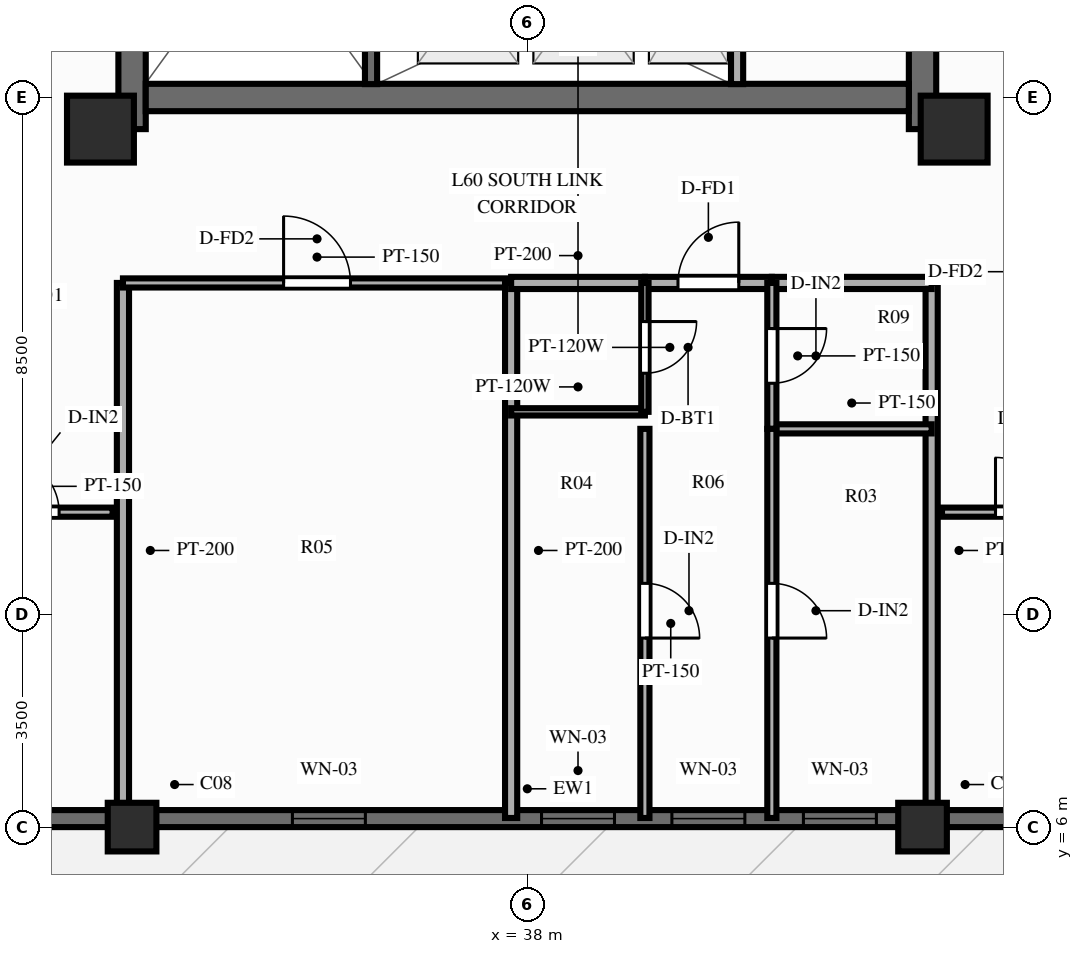
"""IFC4 building model, lengths in metres.
Left out: names, types, materials, properties, quantities, classifications, styles, units other than length and angle.
Written with IfcOpenShell. Run it as: python <this file> out.ifc"""

import sys

from ifc_helpers import new_model, si_unit, direction, frame, frame_2d, origin, origin_2d, place, context, subcontext, project, spatial, rectangle, extrude, source, transform, mapped, element, fill, save


model = new_model("IFC4")
c1 = context("Model", 3, precision=1e-05, world=origin(), true_north=direction((0.0, 1.0)))
c2 = subcontext(c1, "Body", "Model", "MODEL_VIEW")
j1 = project(units=[si_unit("LENGTHUNIT", "METRE"), si_unit("PLANEANGLEUNIT", "RADIAN")], contexts=[c1])
p1 = place(None, origin())
s1 = spatial("IfcSite", under=j1, at=p1, CompositionType="ELEMENT")
p2 = place(p1, origin())
s2 = spatial("IfcBuilding", under=s1, at=p2, CompositionType="ELEMENT")
p3 = place(p2, frame((0.0, 0.0, 192.7)))
s3 = spatial("IfcBuildingStorey", under=s2, at=p3, CompositionType="ELEMENT", Elevation=192.7)
p4 = place(p3, frame((31.5, 17.48, 0.0), z_axis=(0.0, 0.0, 1.0), x_axis=(0.0, 1.0, 0.0)))
e1 = element("IfcWall", 1, at=p4, inside=s3, PredefinedType="SHEAR", context=c2, shape_type="SweptSolid", body=[
    extrude(rectangle(XDim=19.04, YDim=0.45, at=frame_2d((9.52, 0.0))), origin(), (0.0, 0.0, 1.0), 3.9),
])
p5 = place(p4, frame((6.32, 0.0, 0.0)))
e2 = element("IfcOpeningElement", 2, at=p5, cuts=e1, PredefinedType="OPENING", context=c2, shape_type="SweptSolid", body=[
    extrude(rectangle(XDim=1.1, YDim=2.15, at=frame_2d((0.55, 1.075))), frame((0.0, 0.237, 0.0), z_axis=(0.0, -1.0, 0.0), x_axis=(1.0, 0.0, 0.0)), (0.0, 0.0, 1.0), 0.474),
])
p6 = place(p3, frame((44.5, 17.48, 0.0), z_axis=(0.0, 0.0, 1.0), x_axis=(0.0, 1.0, 0.0)))
e3 = element("IfcWall", 3, at=p6, inside=s3, PredefinedType="SHEAR", context=c2, shape_type="SweptSolid", body=[
    extrude(rectangle(XDim=19.04, YDim=0.45, at=frame_2d((9.52, 0.0))), origin(), (0.0, 0.0, 1.0), 3.9),
])
p7 = place(p6, frame((12.67, 0.0, 0.0), z_axis=(0.0, 0.0, 1.0), x_axis=(-1.0, 0.0, 0.0)))
e4 = element("IfcOpeningElement", 4, at=p7, cuts=e3, PredefinedType="OPENING", context=c2, shape_type="SweptSolid", body=[
    extrude(rectangle(XDim=1.1, YDim=2.15, at=frame_2d((0.55, 1.075))), frame((0.0, 0.237, 0.0), z_axis=(0.0, -1.0, 0.0), x_axis=(1.0, 0.0, 0.0)), (0.0, 0.0, 1.0), 0.474),
])
p8 = place(p3, frame((31.725, 18.0, 0.0), z_axis=(0.0, 0.0, 1.0), x_axis=(1.0, 0.0, 0.0)))
e5 = element("IfcWall", 5, at=p8, inside=s3, PredefinedType="SHEAR", context=c2, shape_type="SweptSolid", body=[
    extrude(rectangle(XDim=12.55, YDim=0.45, at=frame_2d((6.275, 0.0))), origin(), (0.0, 0.0, 1.0), 3.9),
])
m1 = source(origin(), c2, "Body", "SweptSolid", [
    extrude(rectangle(XDim=1.1, YDim=1.1, at=origin_2d()), origin(), (0.0, 0.0, 1.0), 3.9),
])
for number, where, z_axis, x_axis in (
    (6, (30.98, 17.48, 0.0), (0.0, 0.0, 1.0), (1.0, 0.0, 0.0)),
    (7, (45.02, 17.48, 0.0), (0.0, 0.0, 1.0), (1.0, 0.0, 0.0)),
):
    element("IfcColumn", number, at=place(p3, frame(where, z_axis=z_axis, x_axis=x_axis)), inside=s3, PredefinedType="COLUMN", context=c2, shape_type="MappedRepresentation", body=[
        mapped(m1, transform((0.0, 0.0, 0.0), scale=1.0)),
    ])
m2 = source(origin(), c2, "Body", "SweptSolid", [
    extrude(rectangle(XDim=0.8, YDim=0.8, at=origin_2d()), origin(), (0.0, 0.0, 1.0), 3.9),
])
for number, where, z_axis, x_axis in (
    (8, (31.5, 6.0, 0.0), (0.0, 0.0, 1.0), (1.0, 0.0, 0.0)),
    (9, (44.5, 6.0, 0.0), (0.0, 0.0, 1.0), (1.0, 0.0, 0.0)),
):
    element("IfcColumn", number, at=place(p3, frame(where, z_axis=z_axis, x_axis=x_axis)), inside=s3, PredefinedType="COLUMN", context=c2, shape_type="MappedRepresentation", body=[
        mapped(m2, transform((0.0, 0.0, 0.0), scale=1.0)),
    ])
p9 = place(p3, frame((22.75, 6.14, 0.0), z_axis=(0.0, 0.0, 1.0), x_axis=(1.0, 0.0, 0.0)))
e10 = element("IfcWall", 10, at=p9, inside=s3, PredefinedType="SOLIDWALL", context=c2, shape_type="SweptSolid", body=[
    extrude(rectangle(XDim=30.5, YDim=0.28, at=frame_2d((15.25, 0.0))), origin(), (0.0, 0.0, 1.0), 2.44),
])
p10 = place(p9, frame((4.925, 0.0, 0.0), z_axis=(0.0, 0.0, 1.0), x_axis=(-1.0, 0.0, 0.0)))
e11 = element("IfcOpeningElement", 11, at=p10, cuts=e10, PredefinedType="OPENING", context=c2, shape_type="SweptSolid", body=[
    extrude(rectangle(XDim=1.1, YDim=2.15, at=frame_2d((0.55, 1.075))), frame((0.0, 0.152, 0.0), z_axis=(0.0, -1.0, 0.0), x_axis=(1.0, 0.0, 0.0)), (0.0, 0.0, 1.0), 0.304),
])
p11 = place(p9, frame((11.387, 0.0, 0.25)))
e12 = element("IfcOpeningElement", 12, at=p11, cuts=e10, PredefinedType="OPENING", context=c2, shape_type="SweptSolid", body=[
    extrude(rectangle(XDim=1.2, YDim=1.5, at=frame_2d((0.6, 0.75))), frame((0.0, 0.152, 0.0), z_axis=(0.0, -1.0, 0.0), x_axis=(1.0, 0.0, 0.0)), (0.0, 0.0, 1.0), 0.304),
])
p12 = place(p9, frame((15.484, 0.0, 0.25)))
e13 = element("IfcOpeningElement", 13, at=p12, cuts=e10, PredefinedType="OPENING", context=c2, shape_type="SweptSolid", body=[
    extrude(rectangle(XDim=1.2, YDim=1.5, at=frame_2d((0.6, 0.75))), frame((0.0, 0.152, 0.0), z_axis=(0.0, -1.0, 0.0), x_axis=(1.0, 0.0, 0.0)), (0.0, 0.0, 1.0), 0.304),
])
p13 = place(p9, frame((17.628, 0.0, 0.25)))
e14 = element("IfcOpeningElement", 14, at=p13, cuts=e10, PredefinedType="OPENING", context=c2, shape_type="SweptSolid", body=[
    extrude(rectangle(XDim=1.2, YDim=1.5, at=frame_2d((0.6, 0.75))), frame((0.0, 0.152, 0.0), z_axis=(0.0, -1.0, 0.0), x_axis=(1.0, 0.0, 0.0)), (0.0, 0.0, 1.0), 0.304),
])
p14 = place(p9, frame((19.791, 0.0, 0.25)))
e15 = element("IfcOpeningElement", 15, at=p14, cuts=e10, PredefinedType="OPENING", context=c2, shape_type="SweptSolid", body=[
    extrude(rectangle(XDim=1.2, YDim=1.5, at=frame_2d((0.6, 0.75))), frame((0.0, 0.152, 0.0), z_axis=(0.0, -1.0, 0.0), x_axis=(1.0, 0.0, 0.0)), (0.0, 0.0, 1.0), 0.304),
])
p15 = place(p9, frame((25.525, 0.0, 0.25)))
e16 = element("IfcOpeningElement", 16, at=p15, cuts=e10, PredefinedType="OPENING", context=c2, shape_type="SweptSolid", body=[
    extrude(rectangle(XDim=1.2, YDim=1.5, at=frame_2d((0.6, 0.75))), frame((0.0, 0.152, 0.0), z_axis=(0.0, -1.0, 0.0), x_axis=(1.0, 0.0, 0.0)), (0.0, 0.0, 1.0), 0.304),
])
p16 = place(p3, frame((41.45, 18.22, 0.0), z_axis=(0.0, 0.0, 1.0), x_axis=(0.0, 1.0, 0.0)))
e17 = element("IfcWall", 17, at=p16, inside=s3, PredefinedType="PARTITIONING", context=c2, shape_type="SweptSolid", body=[
    extrude(rectangle(XDim=2.96, YDim=0.2, at=frame_2d((1.48, 0.0))), origin(), (0.0, 0.0, 1.0), 3.56),
])
p17 = place(p3, frame((35.43, 18.22, 0.0), z_axis=(0.0, 0.0, 1.0), x_axis=(0.0, 1.0, 0.0)))
e18 = element("IfcWall", 18, at=p17, inside=s3, PredefinedType="SOLIDWALL", context=c2, shape_type="SweptSolid", body=[
    extrude(rectangle(XDim=7.22, YDim=0.2, at=frame_2d((3.61, 0.0))), origin(), (0.0, 0.0, 1.0), 3.69),
])
p18 = place(p17, frame((6.68, 0.0, 0.0), z_axis=(0.0, 0.0, 1.0), x_axis=(-1.0, 0.0, 0.0)))
e19 = element("IfcOpeningElement", 19, at=p18, cuts=e18, PredefinedType="OPENING", context=c2, shape_type="SweptSolid", body=[
    extrude(rectangle(XDim=1.1, YDim=2.15, at=frame_2d((0.55, 1.075))), frame((0.0, 0.112, 0.0), z_axis=(0.0, -1.0, 0.0), x_axis=(1.0, 0.0, 0.0)), (0.0, 0.0, 1.0), 0.224),
])
p19 = place(p3, frame((28.85, 11.18, 0.0), z_axis=(0.0, 0.0, 1.0), x_axis=(1.0, 0.0, 0.0)))
e20 = element("IfcWall", 20, at=p19, inside=s3, PredefinedType="PARTITIONING", context=c2, shape_type="SweptSolid", body=[
    extrude(rectangle(XDim=2.33, YDim=0.15, at=frame_2d((1.165, 0.0))), origin(), (0.0, 0.0, 1.0), 2.24),
])
p20 = place(p19, frame((0.55, 0.0, 0.0)))
e21 = element("IfcOpeningElement", 21, at=p20, cuts=e20, PredefinedType="OPENING", context=c2, shape_type="SweptSolid", body=[
    extrude(rectangle(XDim=0.9, YDim=2.1, at=frame_2d((0.45, 1.05))), frame((0.0, 0.087, 0.0), z_axis=(0.0, -1.0, 0.0), x_axis=(1.0, 0.0, 0.0)), (0.0, 0.0, 1.0), 0.174),
])
p21 = place(p3, frame((44.82, 11.18, 0.0), z_axis=(0.0, 0.0, 1.0), x_axis=(1.0, 0.0, 0.0)))
e22 = element("IfcWall", 22, at=p21, inside=s3, PredefinedType="PARTITIONING", context=c2, shape_type="SweptSolid", body=[
    extrude(rectangle(XDim=2.33, YDim=0.15, at=frame_2d((1.165, 0.0))), origin(), (0.0, 0.0, 1.0), 2.24),
])
p22 = place(p21, frame((0.88, 0.0, 0.0)))
e23 = element("IfcOpeningElement", 23, at=p22, cuts=e22, PredefinedType="OPENING", context=c2, shape_type="SweptSolid", body=[
    extrude(rectangle(XDim=0.9, YDim=2.1, at=frame_2d((0.45, 1.05))), frame((0.0, 0.087, 0.0), z_axis=(0.0, -1.0, 0.0), x_axis=(1.0, 0.0, 0.0)), (0.0, 0.0, 1.0), 0.174),
])
for number, where, z_axis, x_axis in (
    (24, (31.35, 14.95, 0.0), (0.0, 0.0, 1.0), (0.0, -1.0, 0.0)),
    (25, (44.65, 14.95, 0.0), (0.0, 0.0, 1.0), (0.0, -1.0, 0.0)),
):
    element("IfcWall", number, at=place(p3, frame(where, z_axis=z_axis, x_axis=x_axis)), inside=s3, PredefinedType="PARTITIONING", context=c2, shape_type="SweptSolid", body=[
        extrude(rectangle(XDim=8.8, YDim=0.2, at=frame_2d((4.4, 0.0))), origin(), (0.0, 0.0, 1.0), 2.44),
    ])
p23 = place(p3, frame((31.35, 14.95, 0.0), z_axis=(0.0, 0.0, 1.0), x_axis=(1.0, 0.0, 0.0)))
e26 = element("IfcWall", 26, at=p23, inside=s3, PredefinedType="PARTITIONING", context=c2, shape_type="SweptSolid", body=[
    extrude(rectangle(XDim=6.384, YDim=0.15, at=frame_2d((3.192, 0.0))), origin(), (0.0, 0.0, 1.0), 3.56),
])
p24 = place(p23, frame((2.642, 0.0, 0.0)))
e27 = element("IfcOpeningElement", 27, at=p24, cuts=e26, PredefinedType="OPENING", context=c2, shape_type="SweptSolid", body=[
    extrude(rectangle(XDim=1.1, YDim=2.15, at=frame_2d((0.55, 1.075))), frame((0.0, 0.087, 0.0), z_axis=(0.0, -1.0, 0.0), x_axis=(1.0, 0.0, 0.0)), (0.0, 0.0, 1.0), 0.174),
])
p25 = place(p3, frame((37.734, 14.95, 0.0), z_axis=(0.0, 0.0, 1.0), x_axis=(0.0, -1.0, 0.0)))
e28 = element("IfcWall", 28, at=p25, inside=s3, PredefinedType="PARTITIONING", context=c2, shape_type="SweptSolid", body=[
    extrude(rectangle(XDim=8.8, YDim=0.2, at=frame_2d((4.4, 0.0))), origin(), (0.0, 0.0, 1.0), 3.56),
])
p26 = place(p3, frame((37.734, 14.95, 0.0), z_axis=(0.0, 0.0, 1.0), x_axis=(1.0, 0.0, 0.0)))
e29 = element("IfcWall", 29, at=p26, inside=s3, PredefinedType="PARTITIONING", context=c2, shape_type="SweptSolid", body=[
    extrude(rectangle(XDim=2.2, YDim=0.2, at=frame_2d((1.1, 0.0))), origin(), (0.0, 0.0, 1.0), 3.56),
])
p27 = place(p3, frame((39.934, 14.95, 0.0), z_axis=(0.0, 0.0, 1.0), x_axis=(1.0, 0.0, 0.0)))
e30 = element("IfcWall", 30, at=p27, inside=s3, PredefinedType="PARTITIONING", context=c2, shape_type="SweptSolid", body=[
    extrude(rectangle(XDim=2.088, YDim=0.2, at=frame_2d((1.044, 0.0))), origin(), (0.0, 0.0, 1.0), 3.56),
])
p28 = place(p27, frame((0.544, 0.0, 0.0)))
e31 = element("IfcOpeningElement", 31, at=p28, cuts=e30, PredefinedType="OPENING", context=c2, shape_type="SweptSolid", body=[
    extrude(rectangle(XDim=1.0, YDim=2.15, at=frame_2d((0.5, 1.075))), frame((0.0, 0.112, 0.0), z_axis=(0.0, -1.0, 0.0), x_axis=(1.0, 0.0, 0.0)), (0.0, 0.0, 1.0), 0.224),
])
p29 = place(p3, frame((42.022, 14.95, 0.0), z_axis=(0.0, 0.0, 1.0), x_axis=(1.0, 0.0, 0.0)))
e32 = element("IfcWall", 32, at=p29, inside=s3, PredefinedType="PARTITIONING", context=c2, shape_type="SweptSolid", body=[
    extrude(rectangle(XDim=2.628, YDim=0.2, at=frame_2d((1.314, 0.0))), origin(), (0.0, 0.0, 1.0), 3.56),
])
p30 = place(p3, frame((37.734, 12.83, 0.0), z_axis=(0.0, 0.0, 1.0), x_axis=(1.0, 0.0, 0.0)))
e33 = element("IfcWall", 33, at=p30, inside=s3, PredefinedType="PARTITIONING", context=c2, shape_type="SweptSolid", body=[
    extrude(rectangle(XDim=2.2, YDim=0.12, at=frame_2d((1.1, 0.0))), origin(), (0.0, 0.0, 1.0), 3.56),
])
p31 = place(p3, frame((42.022, 12.55, 0.0), z_axis=(0.0, 0.0, 1.0), x_axis=(1.0, 0.0, 0.0)))
e34 = element("IfcWall", 34, at=p31, inside=s3, PredefinedType="PARTITIONING", context=c2, shape_type="SweptSolid", body=[
    extrude(rectangle(XDim=2.628, YDim=0.15, at=frame_2d((1.314, 0.0))), origin(), (0.0, 0.0, 1.0), 3.56),
])
p32 = place(p3, frame((39.934, 14.95, 0.0), z_axis=(0.0, 0.0, 1.0), x_axis=(0.0, -1.0, 0.0)))
e35 = element("IfcWall", 35, at=p32, inside=s3, PredefinedType="PARTITIONING", context=c2, shape_type="SweptSolid", body=[
    extrude(rectangle(XDim=2.12, YDim=0.12, at=frame_2d((1.06, 0.0))), origin(), (0.0, 0.0, 1.0), 3.56),
])
p33 = place(p32, frame((0.635, 0.0, 0.0)))
e36 = element("IfcOpeningElement", 36, at=p33, cuts=e35, PredefinedType="OPENING", context=c2, shape_type="SweptSolid", body=[
    extrude(rectangle(XDim=0.85, YDim=2.05, at=frame_2d((0.425, 1.025))), frame((0.0, 0.072, 0.0), z_axis=(0.0, -1.0, 0.0), x_axis=(1.0, 0.0, 0.0)), (0.0, 0.0, 1.0), 0.144),
])
p34 = place(p3, frame((39.934, 12.55, 0.0), z_axis=(0.0, 0.0, 1.0), x_axis=(0.0, -1.0, 0.0)))
e37 = element("IfcWall", 37, at=p34, inside=s3, PredefinedType="PARTITIONING", context=c2, shape_type="SweptSolid", body=[
    extrude(rectangle(XDim=6.4, YDim=0.15, at=frame_2d((3.2, 0.0))), origin(), (0.0, 0.0, 1.0), 3.56),
])
p35 = place(p34, frame((2.541, 0.0, 0.0)))
e38 = element("IfcOpeningElement", 38, at=p35, cuts=e37, PredefinedType="OPENING", context=c2, shape_type="SweptSolid", body=[
    extrude(rectangle(XDim=0.9, YDim=2.1, at=frame_2d((0.45, 1.05))), frame((0.0, 0.087, 0.0), z_axis=(0.0, -1.0, 0.0), x_axis=(1.0, 0.0, 0.0)), (0.0, 0.0, 1.0), 0.174),
])
p36 = place(p3, frame((42.022, 14.95, 0.0), z_axis=(0.0, 0.0, 1.0), x_axis=(0.0, -1.0, 0.0)))
e39 = element("IfcWall", 39, at=p36, inside=s3, PredefinedType="PARTITIONING", context=c2, shape_type="SweptSolid", body=[
    extrude(rectangle(XDim=2.4, YDim=0.15, at=frame_2d((1.2, 0.0))), origin(), (0.0, 0.0, 1.0), 3.56),
])
p37 = place(p36, frame((0.75, 0.0, 0.0)))
e40 = element("IfcOpeningElement", 40, at=p37, cuts=e39, PredefinedType="OPENING", context=c2, shape_type="SweptSolid", body=[
    extrude(rectangle(XDim=0.9, YDim=2.1, at=frame_2d((0.45, 1.05))), frame((0.0, 0.087, 0.0), z_axis=(0.0, -1.0, 0.0), x_axis=(1.0, 0.0, 0.0)), (0.0, 0.0, 1.0), 0.174),
])
p38 = place(p3, frame((42.022, 12.55, 0.0), z_axis=(0.0, 0.0, 1.0), x_axis=(0.0, -1.0, 0.0)))
e41 = element("IfcWall", 41, at=p38, inside=s3, PredefinedType="PARTITIONING", context=c2, shape_type="SweptSolid", body=[
    extrude(rectangle(XDim=6.4, YDim=0.15, at=frame_2d((3.2, 0.0))), origin(), (0.0, 0.0, 1.0), 3.56),
])
p39 = place(p38, frame((2.541, 0.0, 0.0)))
e42 = element("IfcOpeningElement", 42, at=p39, cuts=e41, PredefinedType="OPENING", context=c2, shape_type="SweptSolid", body=[
    extrude(rectangle(XDim=0.9, YDim=2.1, at=frame_2d((0.45, 1.05))), frame((0.0, 0.087, 0.0), z_axis=(0.0, -1.0, 0.0), x_axis=(1.0, 0.0, 0.0)), (0.0, 0.0, 1.0), 0.174),
])
m3 = source(origin(), c2, "Body", "SweptSolid", [
    extrude(rectangle(XDim=1.2, YDim=1.5, at=frame_2d((0.6, 0.75))), frame((0.0, 0.03, 0.0), z_axis=(0.0, -1.0, 0.0), x_axis=(1.0, 0.0, 0.0)), (0.0, 0.0, 1.0), 0.06),
])
p40 = place(p11, origin())
e43 = element("IfcWindow", 43, at=p40, inside=s3, PartitioningType="SINGLE_PANEL", PredefinedType="WINDOW", context=c2, shape_type="MappedRepresentation", body=[
    mapped(m3, transform((0.0, 0.0, 0.0), scale=1.0)),
])
fill(e12, e43)
p41 = place(p12, origin())
e44 = element("IfcWindow", 44, at=p41, inside=s3, PartitioningType="SINGLE_PANEL", PredefinedType="WINDOW", context=c2, shape_type="MappedRepresentation", body=[
    mapped(m3, transform((0.0, 0.0, 0.0), scale=1.0)),
])
fill(e13, e44)
p42 = place(p13, origin())
e45 = element("IfcWindow", 45, at=p42, inside=s3, PartitioningType="SINGLE_PANEL", PredefinedType="WINDOW", context=c2, shape_type="MappedRepresentation", body=[
    mapped(m3, transform((0.0, 0.0, 0.0), scale=1.0)),
])
fill(e14, e45)
p43 = place(p14, origin())
e46 = element("IfcWindow", 46, at=p43, inside=s3, PartitioningType="SINGLE_PANEL", PredefinedType="WINDOW", context=c2, shape_type="MappedRepresentation", body=[
    mapped(m3, transform((0.0, 0.0, 0.0), scale=1.0)),
])
fill(e15, e46)
m4 = source(origin(), c2, "Body", "SweptSolid", [
    extrude(rectangle(XDim=0.9, YDim=2.1, at=frame_2d((0.45, 1.05))), frame((0.0, 0.025, 0.0), z_axis=(0.0, -1.0, 0.0), x_axis=(1.0, 0.0, 0.0)), (0.0, 0.0, 1.0), 0.05),
])
p44 = place(p20, origin())
e47 = element("IfcDoor", 47, at=p44, inside=s3, OperationType="SINGLE_SWING_LEFT", PredefinedType="DOOR", context=c2, shape_type="MappedRepresentation", body=[
    mapped(m4, transform((0.0, 0.0, 0.0), scale=1.0)),
])
fill(e21, e47)
p45 = place(p22, origin())
e48 = element("IfcDoor", 48, at=p45, inside=s3, OperationType="SINGLE_SWING_LEFT", PredefinedType="DOOR", context=c2, shape_type="MappedRepresentation", body=[
    mapped(m4, transform((0.0, 0.0, 0.0), scale=1.0)),
])
fill(e23, e48)
m5 = source(origin(), c2, "Body", "SweptSolid", [
    extrude(rectangle(XDim=1.1, YDim=2.15, at=frame_2d((0.55, 1.075))), frame((0.0, 0.025, 0.0), z_axis=(0.0, -1.0, 0.0), x_axis=(1.0, 0.0, 0.0)), (0.0, 0.0, 1.0), 0.05),
])
p46 = place(p24, origin())
e49 = element("IfcDoor", 49, at=p46, inside=s3, OperationType="SINGLE_SWING_LEFT", PredefinedType="DOOR", context=c2, shape_type="MappedRepresentation", body=[
    mapped(m5, transform((0.0, 0.0, 0.0), scale=1.0)),
])
fill(e27, e49)
m6 = source(origin(), c2, "Body", "SweptSolid", [
    extrude(rectangle(XDim=1.0, YDim=2.15, at=frame_2d((0.5, 1.075))), frame((0.0, 0.025, 0.0), z_axis=(0.0, -1.0, 0.0), x_axis=(1.0, 0.0, 0.0)), (0.0, 0.0, 1.0), 0.05),
])
p47 = place(p28, origin())
e50 = element("IfcDoor", 50, at=p47, inside=s3, OperationType="SINGLE_SWING_RIGHT", PredefinedType="DOOR", context=c2, shape_type="MappedRepresentation", body=[
    mapped(m6, transform((0.0, 0.0, 0.0), scale=1.0)),
])
fill(e31, e50)
m7 = source(origin(), c2, "Body", "SweptSolid", [
    extrude(rectangle(XDim=0.85, YDim=2.05, at=frame_2d((0.425, 1.025))), frame((0.0, 0.025, 0.0), z_axis=(0.0, -1.0, 0.0), x_axis=(1.0, 0.0, 0.0)), (0.0, 0.0, 1.0), 0.05),
])
p48 = place(p33, origin())
e51 = element("IfcDoor", 51, at=p48, inside=s3, OperationType="SINGLE_SWING_LEFT", PredefinedType="DOOR", context=c2, shape_type="MappedRepresentation", body=[
    mapped(m7, transform((0.0, 0.0, 0.0), scale=1.0)),
])
fill(e36, e51)
p49 = place(p35, origin())
e52 = element("IfcDoor", 52, at=p49, inside=s3, OperationType="SINGLE_SWING_RIGHT", PredefinedType="DOOR", context=c2, shape_type="MappedRepresentation", body=[
    mapped(m4, transform((0.0, 0.0, 0.0), scale=1.0)),
])
fill(e38, e52)
p50 = place(p37, origin())
e53 = element("IfcDoor", 53, at=p50, inside=s3, OperationType="SINGLE_SWING_LEFT", PredefinedType="DOOR", context=c2, shape_type="MappedRepresentation", body=[
    mapped(m4, transform((0.0, 0.0, 0.0), scale=1.0)),
])
fill(e40, e53)
p51 = place(p39, origin())
e54 = element("IfcDoor", 54, at=p51, inside=s3, OperationType="SINGLE_SWING_RIGHT", PredefinedType="DOOR", context=c2, shape_type="MappedRepresentation", body=[
    mapped(m4, transform((0.0, 0.0, 0.0), scale=1.0)),
])
fill(e42, e54)
save(model, sys.argv[1])
